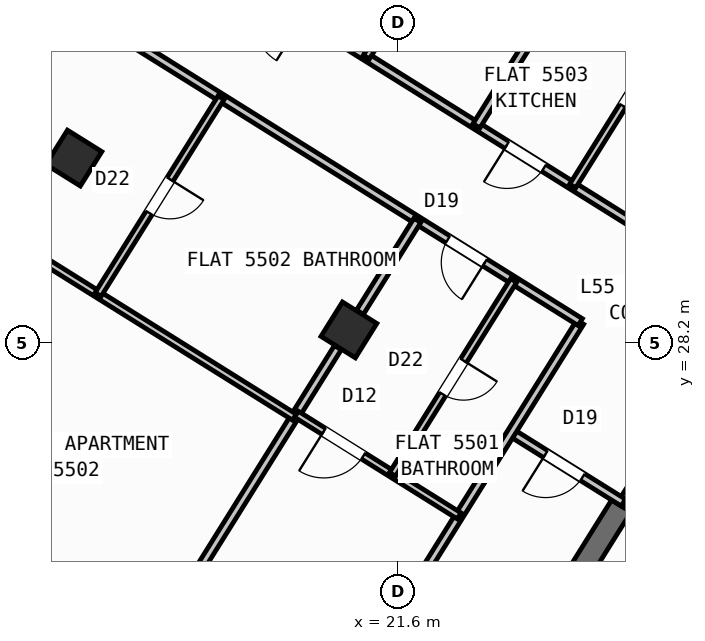
"""IFC4 building model, lengths in metres.
Left out: names, types, materials, properties, quantities, classifications, styles, units other than length and angle.
Written with IfcOpenShell. Run it as: python <this file> out.ifc"""

import sys

from ifc_helpers import new_model, si_unit, direction, frame, frame_2d, origin, origin_2d, place, context, subcontext, project, spatial, rectangle, hollow_rectangle, extrude, source, transform, mapped, element, fill, save


model = new_model("IFC4")
c1 = context("Model", 3, precision=1e-05, world=origin(), true_north=direction((0.0, 1.0)))
c2 = subcontext(c1, "Body", "Model", "MODEL_VIEW")
j1 = project(units=[si_unit("LENGTHUNIT", "METRE"), si_unit("PLANEANGLEUNIT", "RADIAN")], contexts=[c1])
p1 = place(None, origin())
s1 = spatial("IfcSite", under=j1, at=p1, CompositionType="ELEMENT")
p2 = place(p1, origin())
s2 = spatial("IfcBuilding", under=s1, at=p2, CompositionType="ELEMENT")
p3 = place(p2, frame((0.0, 0.0, 218.4)))
s3 = spatial("IfcBuildingStorey", under=s2, at=p3, CompositionType="ELEMENT", Elevation=218.4)
p4 = place(p3, frame((26.007, 24.976, 0.0), z_axis=(0.0, 0.0, 1.0), x_axis=(-0.529931155655, -0.848040665456, 0.0)))
e1 = element("IfcWall", 1, at=p4, inside=s3, PredefinedType="SHEAR", context=c2, shape_type="SweptSolid", body=[
    extrude(rectangle(XDim=6.475, YDim=0.45, at=frame_2d((3.238, 0.0))), origin(), (0.0, 0.0, 1.0), 3.35),
])
m1 = source(origin(), c2, "Body", "SweptSolid", [
    extrude(hollow_rectangle(XDim=0.8, YDim=0.8, WallThickness=0.032, at=origin_2d()), origin(), (0.0, 0.0, 1.0), 3.6),
])
for number, where, z_axis, x_axis in (
    (2, (20.632, 28.452, 0.0), (0.0, 0.0, 1.0), (-0.848, 0.53, 0.0)),
    (3, (15.205, 31.844, 0.0), (0.0, 0.0, 1.0), (-0.848, 0.53, 0.0)),
):
    element("IfcColumn", number, at=place(p3, frame(where, z_axis=z_axis, x_axis=x_axis)), inside=s3, PredefinedType="COLUMN", context=c2, shape_type="MappedRepresentation", body=[
        mapped(m1, transform((0.0, 0.0, 0.0), scale=1.0)),
    ])
p5 = place(p3, frame((31.76, 12.183, 0.0), z_axis=(0.0, 0.0, 1.0), x_axis=(-0.848047074256, 0.529920899612, 0.0)))
e4 = element("IfcWall", 4, at=p5, inside=s3, PredefinedType="STANDARD", context=c2, shape_type="SweptSolid", body=[
    extrude(rectangle(XDim=30.652, YDim=0.32, at=frame_2d((15.326, 0.0))), origin(), (0.0, 0.0, 1.0), 3.35),
])
p6 = place(p5, frame((15.166, 0.0, 0.0)))
e5 = element("IfcOpeningElement", 5, at=p6, cuts=e4, PredefinedType="OPENING", context=c2, shape_type="SweptSolid", body=[
    extrude(rectangle(XDim=1.2, YDim=2.15, at=frame_2d((0.6, 1.075))), frame((0.0, 0.17, 0.0), z_axis=(0.0, -1.0, 0.0), x_axis=(1.0, 0.0, 0.0)), (0.0, 0.0, 1.0), 0.34),
])
p7 = place(p5, frame((2.24, 0.0, 0.9)))
e6 = element("IfcOpeningElement", 6, at=p7, cuts=e4, PredefinedType="OPENING", context=c2, shape_type="SweptSolid", body=[
    extrude(rectangle(XDim=1.65, YDim=1.45, at=frame_2d((0.825, 0.725))), frame((0.0, 0.17, 0.0), z_axis=(0.0, -1.0, 0.0), x_axis=(1.0, 0.0, 0.0)), (0.0, 0.0, 1.0), 0.34),
])
p8 = place(p5, frame((7.469, 0.0, 0.9)))
e7 = element("IfcOpeningElement", 7, at=p8, cuts=e4, PredefinedType="OPENING", context=c2, shape_type="SweptSolid", body=[
    extrude(rectangle(XDim=1.65, YDim=1.45, at=frame_2d((0.825, 0.725))), frame((0.0, 0.17, 0.0), z_axis=(0.0, -1.0, 0.0), x_axis=(1.0, 0.0, 0.0)), (0.0, 0.0, 1.0), 0.34),
])
p9 = place(p5, frame((12.623, 0.0, 1.0)))
e8 = element("IfcOpeningElement", 8, at=p9, cuts=e4, PredefinedType="OPENING", context=c2, shape_type="SweptSolid", body=[
    extrude(rectangle(XDim=0.9, YDim=1.25, at=frame_2d((0.45, 0.625))), frame((0.0, 0.17, 0.0), z_axis=(0.0, -1.0, 0.0), x_axis=(1.0, 0.0, 0.0)), (0.0, 0.0, 1.0), 0.34),
])
p10 = place(p5, frame((19.583, 0.0, 1.0)))
e9 = element("IfcOpeningElement", 9, at=p10, cuts=e4, PredefinedType="OPENING", context=c2, shape_type="SweptSolid", body=[
    extrude(rectangle(XDim=0.9, YDim=1.25, at=frame_2d((0.45, 0.625))), frame((0.0, 0.17, 0.0), z_axis=(0.0, -1.0, 0.0), x_axis=(1.0, 0.0, 0.0)), (0.0, 0.0, 1.0), 0.34),
])
p11 = place(p5, frame((22.033, 0.0, 1.0)))
e10 = element("IfcOpeningElement", 10, at=p11, cuts=e4, PredefinedType="OPENING", context=c2, shape_type="SweptSolid", body=[
    extrude(rectangle(XDim=0.9, YDim=1.25, at=frame_2d((0.45, 0.625))), frame((0.0, 0.17, 0.0), z_axis=(0.0, -1.0, 0.0), x_axis=(1.0, 0.0, 0.0)), (0.0, 0.0, 1.0), 0.34),
])
p12 = place(p5, frame((27.666, 0.0, 0.9)))
e11 = element("IfcOpeningElement", 11, at=p12, cuts=e4, PredefinedType="OPENING", context=c2, shape_type="SweptSolid", body=[
    extrude(rectangle(XDim=1.35, YDim=1.45, at=frame_2d((0.675, 0.725))), frame((0.0, 0.17, 0.0), z_axis=(0.0, -1.0, 0.0), x_axis=(1.0, 0.0, 0.0)), (0.0, 0.0, 1.0), 0.34),
])
p13 = place(p3, frame((5.7, 28.71, 0.0), z_axis=(0.0, 0.0, 1.0), x_axis=(0.529923711467, 0.8480453172, 0.0)))
e12 = element("IfcWall", 12, at=p13, inside=s3, PredefinedType="STANDARD", context=c2, shape_type="SweptSolid", body=[
    extrude(rectangle(XDim=21.587, YDim=0.32, at=frame_2d((10.794, 0.0))), origin(), (0.0, 0.0, 1.0), 2.825),
])
p14 = place(p13, frame((2.319, 0.0, 0.9)))
e13 = element("IfcOpeningElement", 13, at=p14, cuts=e12, PredefinedType="OPENING", context=c2, shape_type="SweptSolid", body=[
    extrude(rectangle(XDim=1.65, YDim=1.45, at=frame_2d((0.825, 0.725))), frame((0.0, 0.17, 0.0), z_axis=(0.0, -1.0, 0.0), x_axis=(1.0, 0.0, 0.0)), (0.0, 0.0, 1.0), 0.34),
])
p15 = place(p13, frame((8.629, 0.0, 1.0)))
e14 = element("IfcOpeningElement", 14, at=p15, cuts=e12, PredefinedType="OPENING", context=c2, shape_type="SweptSolid", body=[
    extrude(rectangle(XDim=0.9, YDim=1.25, at=frame_2d((0.45, 0.625))), frame((0.0, 0.17, 0.0), z_axis=(0.0, -1.0, 0.0), x_axis=(1.0, 0.0, 0.0)), (0.0, 0.0, 1.0), 0.34),
])
p16 = place(p13, frame((13.159, 0.0, 1.0)))
e15 = element("IfcOpeningElement", 15, at=p16, cuts=e12, PredefinedType="OPENING", context=c2, shape_type="SweptSolid", body=[
    extrude(rectangle(XDim=0.9, YDim=1.25, at=frame_2d((0.45, 0.625))), frame((0.0, 0.17, 0.0), z_axis=(0.0, -1.0, 0.0), x_axis=(1.0, 0.0, 0.0)), (0.0, 0.0, 1.0), 0.34),
])
p17 = place(p13, frame((16.232, 0.0, 1.0)))
e16 = element("IfcOpeningElement", 16, at=p17, cuts=e12, PredefinedType="OPENING", context=c2, shape_type="SweptSolid", body=[
    extrude(rectangle(XDim=0.9, YDim=1.25, at=frame_2d((0.45, 0.625))), frame((0.0, 0.17, 0.0), z_axis=(0.0, -1.0, 0.0), x_axis=(1.0, 0.0, 0.0)), (0.0, 0.0, 1.0), 0.34),
])
p18 = place(p13, frame((18.925, 0.0, 0.9)))
e17 = element("IfcOpeningElement", 17, at=p18, cuts=e12, PredefinedType="OPENING", context=c2, shape_type="SweptSolid", body=[
    extrude(rectangle(XDim=1.35, YDim=1.45, at=frame_2d((0.675, 0.725))), frame((0.0, 0.17, 0.0), z_axis=(0.0, -1.0, 0.0), x_axis=(1.0, 0.0, 0.0)), (0.0, 0.0, 1.0), 0.34),
])
p19 = place(p3, frame((17.424, 47.083, 0.0), z_axis=(0.0, 0.0, 1.0), x_axis=(0.848049927979, -0.529916332693, 0.0)))
e18 = element("IfcWall", 18, at=p19, inside=s3, PredefinedType="STANDARD", context=c2, shape_type="SweptSolid", body=[
    extrude(rectangle(XDim=29.223, YDim=0.32, at=frame_2d((14.612, 0.0))), origin(), (0.0, 0.0, 1.0), 3.35),
])
p20 = place(p19, frame((3.77, 0.0, 0.0)))
e19 = element("IfcOpeningElement", 19, at=p20, cuts=e18, PredefinedType="OPENING", context=c2, shape_type="SweptSolid", body=[
    extrude(rectangle(XDim=1.05, YDim=2.15, at=frame_2d((0.525, 1.075))), frame((0.0, 0.17, 0.0), z_axis=(0.0, -1.0, 0.0), x_axis=(1.0, 0.0, 0.0)), (0.0, 0.0, 1.0), 0.34),
])
p21 = place(p19, frame((1.125, 0.0, 0.9)))
e20 = element("IfcOpeningElement", 20, at=p21, cuts=e18, PredefinedType="OPENING", context=c2, shape_type="SweptSolid", body=[
    extrude(rectangle(XDim=1.65, YDim=1.45, at=frame_2d((0.825, 0.725))), frame((0.0, 0.17, 0.0), z_axis=(0.0, -1.0, 0.0), x_axis=(1.0, 0.0, 0.0)), (0.0, 0.0, 1.0), 0.34),
])
p22 = place(p19, frame((7.384, 0.0, 0.9)))
e21 = element("IfcOpeningElement", 21, at=p22, cuts=e18, PredefinedType="OPENING", context=c2, shape_type="SweptSolid", body=[
    extrude(rectangle(XDim=1.35, YDim=1.45, at=frame_2d((0.675, 0.725))), frame((0.0, 0.17, 0.0), z_axis=(0.0, -1.0, 0.0), x_axis=(1.0, 0.0, 0.0)), (0.0, 0.0, 1.0), 0.34),
])
p23 = place(p19, frame((10.054, 0.0, 0.9)))
e22 = element("IfcOpeningElement", 22, at=p23, cuts=e18, PredefinedType="OPENING", context=c2, shape_type="SweptSolid", body=[
    extrude(rectangle(XDim=1.35, YDim=1.45, at=frame_2d((0.675, 0.725))), frame((0.0, 0.17, 0.0), z_axis=(0.0, -1.0, 0.0), x_axis=(1.0, 0.0, 0.0)), (0.0, 0.0, 1.0), 0.34),
])
p24 = place(p19, frame((14.039, 0.0, 1.0)))
e23 = element("IfcOpeningElement", 23, at=p24, cuts=e18, PredefinedType="OPENING", context=c2, shape_type="SweptSolid", body=[
    extrude(rectangle(XDim=0.9, YDim=1.25, at=frame_2d((0.45, 0.625))), frame((0.0, 0.17, 0.0), z_axis=(0.0, -1.0, 0.0), x_axis=(1.0, 0.0, 0.0)), (0.0, 0.0, 1.0), 0.34),
])
p25 = place(p19, frame((17.254, 0.0, 1.0)))
e24 = element("IfcOpeningElement", 24, at=p25, cuts=e18, PredefinedType="OPENING", context=c2, shape_type="SweptSolid", body=[
    extrude(rectangle(XDim=0.9, YDim=1.25, at=frame_2d((0.45, 0.625))), frame((0.0, 0.17, 0.0), z_axis=(0.0, -1.0, 0.0), x_axis=(1.0, 0.0, 0.0)), (0.0, 0.0, 1.0), 0.34),
])
p26 = place(p19, frame((20.161, 0.0, 0.9)))
e25 = element("IfcOpeningElement", 25, at=p26, cuts=e18, PredefinedType="OPENING", context=c2, shape_type="SweptSolid", body=[
    extrude(rectangle(XDim=1.35, YDim=1.45, at=frame_2d((0.675, 0.725))), frame((0.0, 0.17, 0.0), z_axis=(0.0, -1.0, 0.0), x_axis=(1.0, 0.0, 0.0)), (0.0, 0.0, 1.0), 0.34),
])
p27 = place(p19, frame((22.846, 0.0, 0.9)))
e26 = element("IfcOpeningElement", 26, at=p27, cuts=e18, PredefinedType="OPENING", context=c2, shape_type="SweptSolid", body=[
    extrude(rectangle(XDim=1.35, YDim=1.45, at=frame_2d((0.675, 0.725))), frame((0.0, 0.17, 0.0), z_axis=(0.0, -1.0, 0.0), x_axis=(1.0, 0.0, 0.0)), (0.0, 0.0, 1.0), 0.34),
])
p28 = place(p19, frame((26.898, 0.0, 1.0)))
e27 = element("IfcOpeningElement", 27, at=p28, cuts=e18, PredefinedType="OPENING", context=c2, shape_type="SweptSolid", body=[
    extrude(rectangle(XDim=0.9, YDim=1.25, at=frame_2d((0.45, 0.625))), frame((0.0, 0.17, 0.0), z_axis=(0.0, -1.0, 0.0), x_axis=(1.0, 0.0, 0.0)), (0.0, 0.0, 1.0), 0.34),
])
p29 = place(p3, frame((27.596, 27.52, 0.0), z_axis=(0.0, 0.0, 1.0), x_axis=(-0.529865479138, -0.848081702443, 0.0)))
e28 = element("IfcWall", 28, at=p29, inside=s3, PredefinedType="STANDARD", context=c2, shape_type="SweptSolid", body=[
    extrude(rectangle(XDim=2.96, YDim=0.2, at=frame_2d((1.48, 0.0))), origin(), (0.0, 0.0, 1.0), 3.34),
])
p30 = place(p29, frame((0.7, 0.0, 0.0)))
e29 = element("IfcOpeningElement", 29, at=p30, cuts=e28, PredefinedType="OPENING", context=c2, shape_type="SweptSolid", body=[
    extrude(rectangle(XDim=1.5, YDim=2.15, at=frame_2d((0.75, 1.075))), frame((0.0, 0.11, 0.0), z_axis=(0.0, -1.0, 0.0), x_axis=(1.0, 0.0, 0.0)), (0.0, 0.0, 1.0), 0.22),
])
p31 = place(p3, frame((26.049, 25.044, 0.0), z_axis=(0.0, 0.0, 1.0), x_axis=(-0.848050851465, 0.529914854792, 0.0)))
e30 = element("IfcWall", 30, at=p31, inside=s3, PredefinedType="PARTITIONING", context=c2, shape_type="SweptSolid", body=[
    extrude(rectangle(XDim=2.61, YDim=0.16, at=frame_2d((1.305, 0.0))), origin(), (0.0, 0.0, 1.0), 2.825),
])
p32 = place(p31, frame((0.95, 0.0, 0.0)))
e31 = element("IfcOpeningElement", 31, at=p32, cuts=e30, PredefinedType="OPENING", context=c2, shape_type="SweptSolid", body=[
    extrude(rectangle(XDim=0.86, YDim=2.05, at=frame_2d((0.43, 1.025))), frame((0.0, 0.09, 0.0), z_axis=(0.0, -1.0, 0.0), x_axis=(1.0, 0.0, 0.0)), (0.0, 0.0, 1.0), 0.18),
])
p33 = place(p3, frame((25.198, 28.606, 0.0), z_axis=(0.0, 0.0, 1.0), x_axis=(-0.529926497642, -0.848043576178, 0.0)))
e32 = element("IfcWall", 32, at=p33, inside=s3, PredefinedType="PARTITIONING", context=c2, shape_type="SweptSolid", body=[
    extrude(rectangle(XDim=10.3, YDim=0.16, at=frame_2d((5.15, 0.0))), origin(), (0.0, 0.0, 1.0), 3.34),
])
p34 = place(p3, frame((26.363, 30.472, 0.0), z_axis=(0.0, 0.0, 1.0), x_axis=(-0.848052408131, 0.529912363569, 0.0)))
e33 = element("IfcWall", 33, at=p34, inside=s3, PredefinedType="PARTITIONING", context=c2, shape_type="SweptSolid", body=[
    extrude(rectangle(XDim=16.73, YDim=0.16, at=frame_2d((8.365, 0.0))), origin(), (0.0, 0.0, 1.0), 3.34),
])
p35 = place(p34, frame((2.22, 0.0, 0.0)))
e34 = element("IfcOpeningElement", 34, at=p35, cuts=e33, PredefinedType="OPENING", context=c2, shape_type="SweptSolid", body=[
    extrude(rectangle(XDim=0.86, YDim=2.05, at=frame_2d((0.43, 1.025))), frame((0.0, 0.09, 0.0), z_axis=(0.0, -1.0, 0.0), x_axis=(1.0, 0.0, 0.0)), (0.0, 0.0, 1.0), 0.18),
])
p36 = place(p34, frame((7.82, 0.0, 0.0)))
e35 = element("IfcOpeningElement", 35, at=p36, cuts=e33, PredefinedType="OPENING", context=c2, shape_type="SweptSolid", body=[
    extrude(rectangle(XDim=1.0, YDim=2.1, at=frame_2d((0.5, 1.05))), frame((0.0, 0.09, 0.0), z_axis=(0.0, -1.0, 0.0), x_axis=(1.0, 0.0, 0.0)), (0.0, 0.0, 1.0), 0.18),
])
p37 = place(p34, frame((12.95, 0.0, 0.0)))
e36 = element("IfcOpeningElement", 36, at=p37, cuts=e33, PredefinedType="OPENING", context=c2, shape_type="SweptSolid", body=[
    extrude(rectangle(XDim=1.0, YDim=2.1, at=frame_2d((0.5, 1.05))), frame((0.0, 0.09, 0.0), z_axis=(0.0, -1.0, 0.0), x_axis=(1.0, 0.0, 0.0)), (0.0, 0.0, 1.0), 0.18),
])
p38 = place(p3, frame((25.198, 28.606, 0.0), z_axis=(0.0, 0.0, 1.0), x_axis=(-0.848052408131, 0.529912363569, 0.0)))
e37 = element("IfcWall", 37, at=p38, inside=s3, PredefinedType="PARTITIONING", context=c2, shape_type="SweptSolid", body=[
    extrude(rectangle(XDim=16.73, YDim=0.16, at=frame_2d((8.365, 0.0))), origin(), (0.0, 0.0, 1.0), 3.34),
])
p39 = place(p38, frame((2.22, 0.0, 0.0)))
e38 = element("IfcOpeningElement", 38, at=p39, cuts=e37, PredefinedType="OPENING", context=c2, shape_type="SweptSolid", body=[
    extrude(rectangle(XDim=0.86, YDim=2.05, at=frame_2d((0.43, 1.025))), frame((0.0, 0.09, 0.0), z_axis=(0.0, -1.0, 0.0), x_axis=(1.0, 0.0, 0.0)), (0.0, 0.0, 1.0), 0.18),
])
p40 = place(p38, frame((12.084, 0.0, 0.0)))
e39 = element("IfcOpeningElement", 39, at=p40, cuts=e37, PredefinedType="OPENING", context=c2, shape_type="SweptSolid", body=[
    extrude(rectangle(XDim=1.0, YDim=2.1, at=frame_2d((0.5, 1.05))), frame((0.0, 0.09, 0.0), z_axis=(0.0, -1.0, 0.0), x_axis=(1.0, 0.0, 0.0)), (0.0, 0.0, 1.0), 0.18),
])
p41 = place(p3, frame((21.983, 30.615, 0.0), z_axis=(0.0, 0.0, 1.0), x_axis=(-0.529978410432, -0.848011134641, 0.0)))
e40 = element("IfcWall", 40, at=p41, inside=s3, PredefinedType="PARTITIONING", context=c2, shape_type="SweptSolid", body=[
    extrude(rectangle(XDim=2.138, YDim=0.16, at=frame_2d((1.069, 0.0))), origin(), (0.0, 0.0, 1.0), 2.825),
])
p42 = place(p3, frame((20.414, 28.103, 0.0), z_axis=(0.0, 0.0, 1.0), x_axis=(-0.529934553702, -0.848038542045, 0.0)))
e41 = element("IfcWall", 41, at=p42, inside=s3, PredefinedType="PARTITIONING", context=c2, shape_type="SweptSolid", body=[
    extrude(rectangle(XDim=6.476, YDim=0.16, at=frame_2d((3.238, 0.0))), origin(), (0.0, 0.0, 1.0), 2.825),
])
p43 = place(p3, frame((22.807, 24.781, 0.0), z_axis=(0.0, 0.0, 1.0), x_axis=(-0.84803087207, 0.529946827537, 0.0)))
e42 = element("IfcWall", 42, at=p43, inside=s3, PredefinedType="PLUMBINGWALL", context=c2, shape_type="SweptSolid", body=[
    extrude(rectangle(XDim=3.79, YDim=0.14, at=frame_2d((1.895, 0.0))), origin(), (0.0, 0.0, 1.0), 3.34),
])
p44 = place(p43, frame((2.23, 0.0, 0.0)))
e43 = element("IfcOpeningElement", 43, at=p44, cuts=e42, PredefinedType="OPENING", context=c2, shape_type="SweptSolid", body=[
    extrude(rectangle(XDim=0.92, YDim=2.08, at=frame_2d((0.46, 1.04))), frame((0.0, 0.08, 0.0), z_axis=(0.0, -1.0, 0.0), x_axis=(1.0, 0.0, 0.0)), (0.0, 0.0, 1.0), 0.16),
])
p45 = place(p3, frame((23.883, 29.427, 0.0), z_axis=(0.0, 0.0, 1.0), x_axis=(-0.529950281337, -0.84802871373, 0.0)))
e44 = element("IfcWall", 44, at=p45, inside=s3, PredefinedType="PLUMBINGWALL", context=c2, shape_type="SweptSolid", body=[
    extrude(rectangle(XDim=4.51, YDim=0.14, at=frame_2d((2.255, 0.0))), origin(), (0.0, 0.0, 1.0), 2.995),
])
p46 = place(p45, frame((1.865, 0.0, 0.0)))
e45 = element("IfcOpeningElement", 45, at=p46, cuts=e44, PredefinedType="OPENING", context=c2, shape_type="SweptSolid", body=[
    extrude(rectangle(XDim=0.78, YDim=2.05, at=frame_2d((0.39, 1.025))), frame((0.0, 0.08, 0.0), z_axis=(0.0, -1.0, 0.0), x_axis=(1.0, 0.0, 0.0)), (0.0, 0.0, 1.0), 0.16),
])
p47 = place(p3, frame((19.556, 26.73, 0.0), z_axis=(0.0, 0.0, 1.0), x_axis=(-0.848043949058, 0.52992590092, 0.0)))
e46 = element("IfcWall", 46, at=p47, inside=s3, PredefinedType="PLUMBINGWALL", context=c2, shape_type="SweptSolid", body=[
    extrude(rectangle(XDim=12.92, YDim=0.14, at=frame_2d((6.46, 0.0))), origin(), (0.0, 0.0, 1.0), 3.34),
])
p48 = place(p47, frame((5.849, 0.0, 0.0)))
e47 = element("IfcOpeningElement", 47, at=p48, cuts=e46, PredefinedType="OPENING", context=c2, shape_type="SweptSolid", body=[
    extrude(rectangle(XDim=0.92, YDim=2.08, at=frame_2d((0.46, 1.04))), frame((0.0, 0.08, 0.0), z_axis=(0.0, -1.0, 0.0), x_axis=(1.0, 0.0, 0.0)), (0.0, 0.0, 1.0), 0.16),
])
p49 = place(p3, frame((18.109, 33.035, 0.0), z_axis=(0.0, 0.0, 1.0), x_axis=(-0.529893526057, -0.848064178611, 0.0)))
e48 = element("IfcWall", 48, at=p49, inside=s3, PredefinedType="PLUMBINGWALL", context=c2, shape_type="SweptSolid", body=[
    extrude(rectangle(XDim=4.58, YDim=0.14, at=frame_2d((2.29, 0.0))), origin(), (0.0, 0.0, 1.0), 3.34),
])
p50 = place(p49, frame((1.9, 0.0, 0.0)))
e49 = element("IfcOpeningElement", 49, at=p50, cuts=e48, PredefinedType="OPENING", context=c2, shape_type="SweptSolid", body=[
    extrude(rectangle(XDim=0.78, YDim=2.05, at=frame_2d((0.39, 1.025))), frame((0.0, 0.08, 0.0), z_axis=(0.0, -1.0, 0.0), x_axis=(1.0, 0.0, 0.0)), (0.0, 0.0, 1.0), 0.16),
])
p51 = place(p3, frame((24.282, 34.293, 0.0), z_axis=(0.0, 0.0, 1.0), x_axis=(-0.529927092104, -0.84804320471, 0.0)))
e50 = element("IfcWall", 50, at=p51, inside=s3, PredefinedType="PARTITIONING", context=c2, shape_type="SweptSolid", body=[
    extrude(rectangle(XDim=2.138, YDim=0.16, at=frame_2d((1.069, 0.0))), origin(), (0.0, 0.0, 1.0), 2.825),
])
p52 = place(p3, frame((27.439, 35.118, 0.0), z_axis=(0.0, 0.0, 1.0), x_axis=(-0.529911350634, -0.84805304107, 0.0)))
e51 = element("IfcWall", 51, at=p52, inside=s3, PredefinedType="PLUMBINGWALL", context=c2, shape_type="SweptSolid", body=[
    extrude(rectangle(XDim=4.51, YDim=0.14, at=frame_2d((2.255, 0.0))), origin(), (0.0, 0.0, 1.0), 2.995),
])
p53 = place(p52, frame((1.865, 0.0, 0.0)))
e52 = element("IfcOpeningElement", 52, at=p53, cuts=e51, PredefinedType="OPENING", context=c2, shape_type="SweptSolid", body=[
    extrude(rectangle(XDim=0.78, YDim=2.05, at=frame_2d((0.39, 1.025))), frame((0.0, 0.08, 0.0), z_axis=(0.0, -1.0, 0.0), x_axis=(1.0, 0.0, 0.0)), (0.0, 0.0, 1.0), 0.16),
])
p54 = place(p3, frame((23.405, 37.721, 0.0), z_axis=(0.0, 0.0, 1.0), x_axis=(-0.529955816375, -0.848025254748, 0.0)))
e53 = element("IfcWall", 53, at=p54, inside=s3, PredefinedType="PLUMBINGWALL", context=c2, shape_type="SweptSolid", body=[
    extrude(rectangle(XDim=4.58, YDim=0.14, at=frame_2d((2.29, 0.0))), origin(), (0.0, 0.0, 1.0), 3.34),
])
p55 = place(p54, frame((1.9, 0.0, 0.0)))
e54 = element("IfcOpeningElement", 54, at=p55, cuts=e53, PredefinedType="OPENING", context=c2, shape_type="SweptSolid", body=[
    extrude(rectangle(XDim=0.78, YDim=2.05, at=frame_2d((0.39, 1.025))), frame((0.0, 0.08, 0.0), z_axis=(0.0, -1.0, 0.0), x_axis=(1.0, 0.0, 0.0)), (0.0, 0.0, 1.0), 0.16),
])
m2 = source(origin(), c2, "Body", "SweptSolid", [
    extrude(rectangle(XDim=0.86, YDim=2.05, at=frame_2d((0.43, 1.025))), frame((0.0, 0.025, 0.0), z_axis=(0.0, -1.0, 0.0), x_axis=(1.0, 0.0, 0.0)), (0.0, 0.0, 1.0), 0.05),
])
p56 = place(p32, origin())
e55 = element("IfcDoor", 55, at=p56, inside=s3, OperationType="SINGLE_SWING_RIGHT", PredefinedType="DOOR", context=c2, shape_type="MappedRepresentation", body=[
    mapped(m2, transform((0.0, 0.0, 0.0), scale=1.0)),
])
fill(e31, e55)
p57 = place(p39, origin())
e56 = element("IfcDoor", 56, at=p57, inside=s3, OperationType="SINGLE_SWING_LEFT", PredefinedType="DOOR", context=c2, shape_type="MappedRepresentation", body=[
    mapped(m2, transform((0.0, 0.0, 0.0), scale=1.0)),
])
fill(e38, e56)
m3 = source(origin(), c2, "Body", "SweptSolid", [
    extrude(rectangle(XDim=0.92, YDim=2.08, at=frame_2d((0.46, 1.04))), frame((0.0, 0.025, 0.0), z_axis=(0.0, -1.0, 0.0), x_axis=(1.0, 0.0, 0.0)), (0.0, 0.0, 1.0), 0.05),
])
p58 = place(p44, origin())
e57 = element("IfcDoor", 57, at=p58, inside=s3, OperationType="SINGLE_SWING_RIGHT", PredefinedType="DOOR", context=c2, shape_type="MappedRepresentation", body=[
    mapped(m3, transform((0.0, 0.0, 0.0), scale=1.0)),
])
fill(e43, e57)
m4 = source(origin(), c2, "Body", "SweptSolid", [
    extrude(rectangle(XDim=0.78, YDim=2.05, at=frame_2d((0.39, 1.025))), frame((0.0, 0.025, 0.0), z_axis=(0.0, -1.0, 0.0), x_axis=(1.0, 0.0, 0.0)), (0.0, 0.0, 1.0), 0.05),
])
p59 = place(p46, origin())
e58 = element("IfcDoor", 58, at=p59, inside=s3, OperationType="SINGLE_SWING_LEFT", PredefinedType="DOOR", context=c2, shape_type="MappedRepresentation", body=[
    mapped(m4, transform((0.0, 0.0, 0.0), scale=1.0)),
])
fill(e45, e58)
p60 = place(p50, origin())
e59 = element("IfcDoor", 59, at=p60, inside=s3, OperationType="SINGLE_SWING_LEFT", PredefinedType="DOOR", context=c2, shape_type="MappedRepresentation", body=[
    mapped(m4, transform((0.0, 0.0, 0.0), scale=1.0)),
])
fill(e49, e59)
p61 = place(p35, origin())
e60 = element("IfcDoor", 60, at=p61, inside=s3, OperationType="SINGLE_SWING_RIGHT", PredefinedType="DOOR", context=c2, shape_type="MappedRepresentation", body=[
    mapped(m2, transform((0.0, 0.0, 0.0), scale=1.0)),
])
fill(e34, e60)
p62 = place(p53, origin())
e61 = element("IfcDoor", 61, at=p62, inside=s3, OperationType="SINGLE_SWING_RIGHT", PredefinedType="DOOR", context=c2, shape_type="MappedRepresentation", body=[
    mapped(m4, transform((0.0, 0.0, 0.0), scale=1.0)),
])
fill(e52, e61)
save(model, sys.argv[1])
